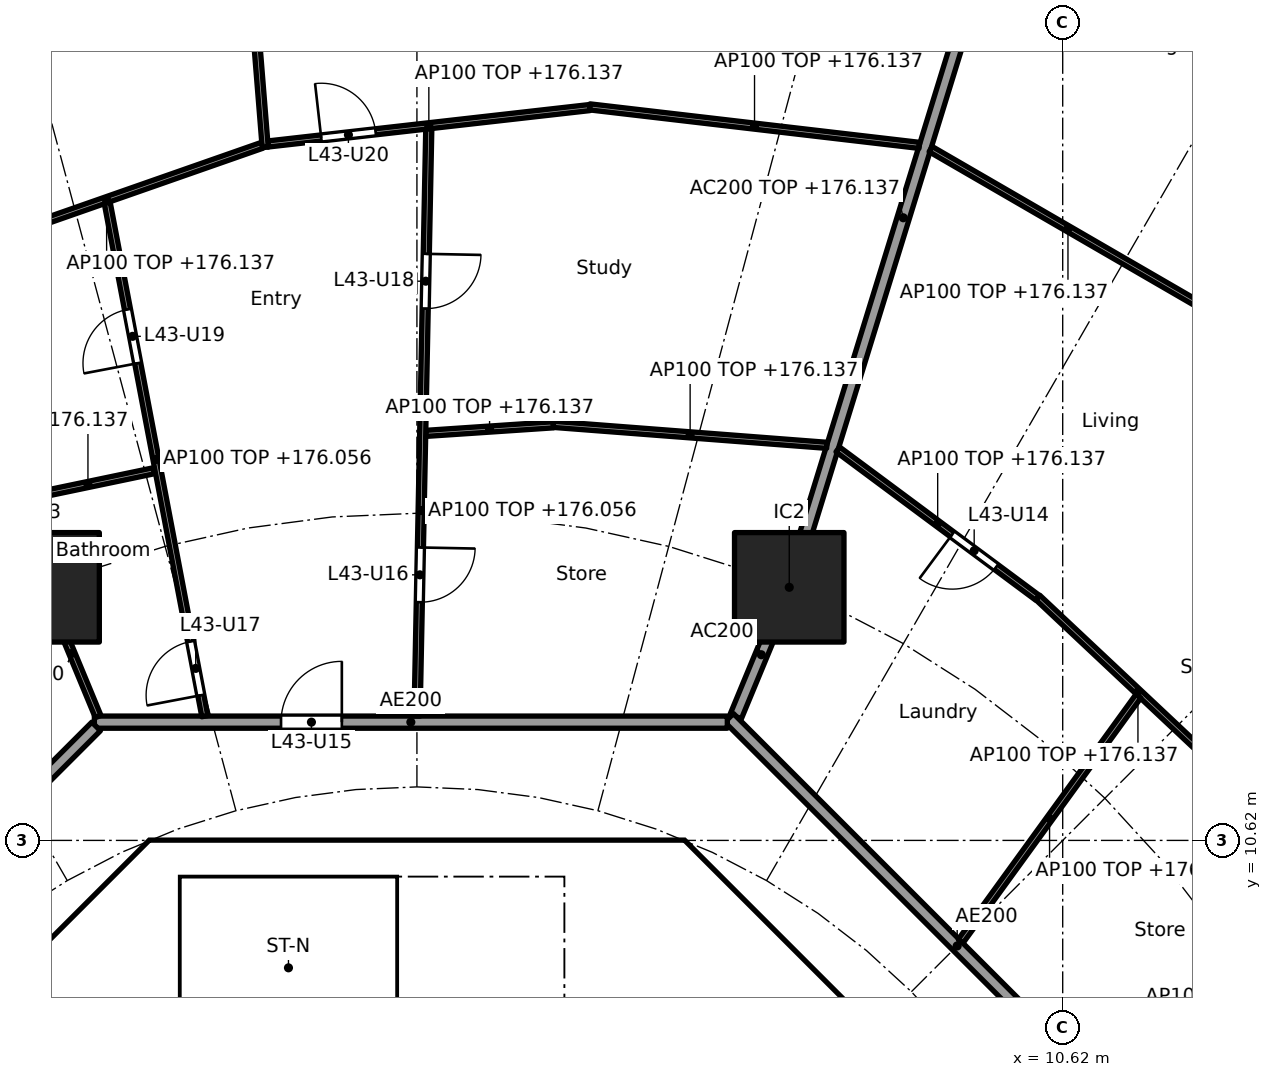
"""IFC4 building model, lengths in metres.
Left out: names, types, materials, properties, quantities, classifications, styles, units other than length and angle.
Written with IfcOpenShell. Run it as: python <this file> out.ifc"""

import sys

from ifc_helpers import new_model, si_unit, direction, frame, frame_2d, origin, origin_2d, place, context, subcontext, project, spatial, polyline, rectangle, outline, extrude, element, fill, save


model = new_model("IFC4")
c1 = context("Model", 3, precision=1e-05, world=origin(), true_north=direction((0.0, 1.0)))
c2 = subcontext(c1, "Body", "Model", "MODEL_VIEW")
j1 = project(units=[si_unit("LENGTHUNIT", "METRE"), si_unit("PLANEANGLEUNIT", "RADIAN")], contexts=[c1])
p1 = place(None, origin())
s1 = spatial("IfcSite", under=j1, at=p1, CompositionType="ELEMENT")
p2 = place(p1, origin())
s2 = spatial("IfcBuilding", under=s1, at=p2, CompositionType="ELEMENT")
p3 = place(p2, frame((0.0, 0.0, 173.3)))
s3 = spatial("IfcBuildingStorey", under=s2, at=p3, CompositionType="ELEMENT", Elevation=173.3)
for number, where, z_axis, x_axis in (
    (1, (6.123, 14.782, 0.0), (0.0, 0.0, 1.0), (1.0, 0.0, 0.0)),
    (2, (-6.123, 14.782, 0.0), (0.0, 0.0, 1.0), (1.0, 0.0, 0.0)),
):
    element("IfcColumn", number, at=place(p3, frame(where, z_axis=z_axis, x_axis=x_axis)), inside=s3, PredefinedType="COLUMN", context=c2, shape_type="SweptSolid", body=[
        extrude(rectangle(XDim=1.8, YDim=1.8, at=origin_2d()), origin(), (0.0, 0.0, 1.0), 3.7),
    ])
p4 = place(p3, frame((9.988, 4.613, 0.0), z_axis=(0.0, 0.0, 1.0), x_axis=(-0.707106781187, 0.707106781187, 0.0)))
e3 = element("IfcWall", 3, at=p4, inside=s3, PredefinedType="SHEAR", context=c2, shape_type="SweptSolid", body=[
    extrude(rectangle(XDim=7.602, YDim=0.6, at=frame_2d((3.801, 0.0))), origin(), (0.0, 0.0, 1.0), 3.44),
])
p5 = place(p4, frame((3.201, 0.0, 0.0)))
e4 = element("IfcOpeningElement", 4, at=p5, cuts=e3, PredefinedType="OPENING", context=c2, shape_type="SweptSolid", body=[
    extrude(rectangle(XDim=1.2, YDim=2.1, at=frame_2d((0.6, 1.05))), frame((0.0, 0.31, 0.0), z_axis=(0.0, -1.0, 0.0), x_axis=(1.0, 0.0, 0.0)), (0.0, 0.0, 1.0), 0.62),
])
p6 = place(p3, frame((-4.613, 9.988, 0.0), z_axis=(0.0, 0.0, 1.0), x_axis=(-0.707106781187, -0.707106781187, 0.0)))
e5 = element("IfcWall", 5, at=p6, inside=s3, PredefinedType="SHEAR", context=c2, shape_type="SweptSolid", body=[
    extrude(rectangle(XDim=7.602, YDim=0.6, at=frame_2d((3.801, 0.0))), origin(), (0.0, 0.0, 1.0), 3.44),
])
p7 = place(p6, frame((0.351, 0.0, 0.0)))
e6 = element("IfcOpeningElement", 6, at=p7, cuts=e5, PredefinedType="OPENING", context=c2, shape_type="SweptSolid", body=[
    extrude(rectangle(XDim=1.1, YDim=2.1, at=frame_2d((0.55, 1.05))), frame((0.0, 0.31, 0.0), z_axis=(0.0, -1.0, 0.0), x_axis=(1.0, 0.0, 0.0)), (0.0, 0.0, 1.0), 0.62),
])
p8 = place(p3, frame((-5.8, 4.3, 0.0), z_axis=(0.0, 0.0, 1.0), x_axis=(0.0, 1.0, 0.0)))
e7 = element("IfcWall", 7, at=p8, inside=s3, PredefinedType="PARTITIONING", context=c2, shape_type="SweptSolid", body=[
    extrude(rectangle(XDim=3.927, YDim=0.15, at=frame_2d((1.963, 0.0))), origin(), (0.0, 0.0, 1.0), 3.44),
])
p9 = place(p8, frame((0.413, 0.0, 0.0)))
e8 = element("IfcOpeningElement", 8, at=p9, cuts=e7, PredefinedType="OPENING", context=c2, shape_type="SweptSolid", body=[
    extrude(rectangle(XDim=0.9, YDim=2.1, at=frame_2d((0.45, 1.05))), frame((0.0, 0.085, 0.0), z_axis=(0.0, -1.0, 0.0), x_axis=(1.0, 0.0, 0.0)), (0.0, 0.0, 1.0), 0.17),
])
p10 = place(p8, frame((2.489, 0.0, 0.0)))
e9 = element("IfcOpeningElement", 9, at=p10, cuts=e7, PredefinedType="OPENING", context=c2, shape_type="SweptSolid", body=[
    extrude(rectangle(XDim=0.9, YDim=2.1, at=frame_2d((0.45, 1.05))), frame((0.0, 0.085, 0.0), z_axis=(0.0, -1.0, 0.0), x_axis=(1.0, 0.0, 0.0)), (0.0, 0.0, 1.0), 0.17),
])
p11 = place(p3, frame((4.0, 7.025, 0.0), z_axis=(0.0, 0.0, 1.0), x_axis=(0.0, 1.0, 0.0)))
e10 = element("IfcWall", 10, at=p11, inside=s3, PredefinedType="SOLIDWALL", context=c2, shape_type="SweptSolid", body=[
    extrude(rectangle(XDim=3.0, YDim=0.2, at=frame_2d((1.5, 0.0))), origin(), (0.0, 0.0, 1.0), 3.44),
])
p12 = place(p11, frame((0.925, 0.0, 0.0)))
e11 = element("IfcOpeningElement", 11, at=p12, cuts=e10, PredefinedType="OPENING", context=c2, shape_type="SweptSolid", body=[
    extrude(rectangle(XDim=1.1, YDim=2.1, at=frame_2d((0.55, 1.05))), frame((0.0, 0.11, 0.0), z_axis=(0.0, -1.0, 0.0), x_axis=(1.0, 0.0, 0.0)), (0.0, 0.0, 1.0), 0.22),
])
p13 = place(p3, origin())
e12 = element("IfcWall", 12, at=p13, inside=s3, PredefinedType="SHEAR", context=c2, shape_type="SweptSolid", body=[
    extrude(outline(polyline([(-4.152, 10.025), (-4.401, 9.776), (-4.825, 10.2), (-4.401, 10.625), (4.401, 10.625), (4.825, 10.2), (4.401, 9.776), (4.152, 10.025), (-4.152, 10.025)])), origin(), (0.0, 0.0, 1.0), 3.44),
])
p14 = place(p3, origin())
e13 = element("IfcWall", 13, at=p14, inside=s3, PredefinedType="SOLIDWALL", context=c2, shape_type="SweptSolid", body=[
    extrude(outline(polyline([(-3.9, 7.025), (-4.1, 7.025), (-4.1, 10.025), (-3.9, 10.025), (-3.9, 7.025)])), origin(), (0.0, 0.0, 1.0), 3.44),
])
p15 = place(p3, frame((5.243, 12.657, 0.0), z_axis=(0.0, 0.0, 1.0), x_axis=(0.382747093259, 0.923853160736, 0.0)))
e14 = element("IfcWall", 14, at=p15, inside=s3, PredefinedType="PARTITIONING", context=c2, shape_type="SweptSolid", body=[
    extrude(rectangle(XDim=2.2, YDim=0.2, at=frame_2d((1.1, 0.0))), origin(), (0.0, 0.0, 1.0), 3.44),
])
p16 = place(p3, frame((6.138, 14.83, 0.0), z_axis=(0.0, 0.0, 1.0), x_axis=(0.294818517221, 0.955553264818, 0.0)))
e15 = element("IfcWall", 15, at=p16, inside=s3, PredefinedType="PARTITIONING", context=c2, shape_type="SweptSolid", body=[
    extrude(rectangle(XDim=12.619, YDim=0.2, at=frame_2d((6.31, 0.0))), origin(), (0.0, 0.0, 1.0), 2.837),
])
p17 = place(p3, frame((12.635, 5.134, 0.0), z_axis=(0.0, 0.0, 1.0), x_axis=(-0.707106781187, 0.707106781187, 0.0)))
e16 = element("IfcWall", 16, at=p17, inside=s3, PredefinedType="PARTITIONING", context=c2, shape_type="SweptSolid", body=[
    extrude(rectangle(XDim=10.609, YDim=0.2, at=frame_2d((5.305, 0.0))), origin(), (0.0, 0.0, 1.0), 3.44),
])
p18 = place(p3, frame((5.104, 12.565, 0.0), z_axis=(0.0, 0.0, 1.0), x_axis=(-1.0, 0.0, 0.0)))
e17 = element("IfcWall", 17, at=p18, inside=s3, PredefinedType="PARTITIONING", context=c2, shape_type="SweptSolid", body=[
    extrude(rectangle(XDim=10.409, YDim=0.2, at=frame_2d((5.205, 0.0))), origin(), (0.0, 0.0, 1.0), 3.44),
])
p19 = place(p18, frame((6.339, 0.0, 0.0)))
e18 = element("IfcOpeningElement", 18, at=p19, cuts=e17, PredefinedType="OPENING", context=c2, shape_type="SweptSolid", body=[
    extrude(rectangle(XDim=1.0, YDim=2.1, at=frame_2d((0.5, 1.05))), frame((0.0, 0.11, 0.0), z_axis=(0.0, -1.0, 0.0), x_axis=(1.0, 0.0, 0.0)), (0.0, 0.0, 1.0), 0.22),
])
p20 = place(p3, frame((-5.275, 12.494, 0.0), z_axis=(0.0, 0.0, 1.0), x_axis=(-0.707106781187, -0.707106781187, 0.0)))
e19 = element("IfcWall", 19, at=p20, inside=s3, PredefinedType="PARTITIONING", context=c2, shape_type="SweptSolid", body=[
    extrude(rectangle(XDim=10.209, YDim=0.2, at=frame_2d((5.104, 0.0))), origin(), (0.0, 0.0, 1.0), 3.44),
])
p21 = place(p3, frame((13.504, 11.52, 0.0), z_axis=(0.0, 0.0, 1.0), x_axis=(-0.728883199496, 0.684638066055, 0.0)))
e20 = element("IfcWall", 20, at=p21, inside=s3, PredefinedType="PARTITIONING", context=c2, shape_type="SweptSolid", body=[
    extrude(rectangle(XDim=4.519, YDim=0.1, at=frame_2d((2.26, 0.0))), origin(), (0.0, 0.0, 1.0), 2.837),
])
p22 = place(p3, frame((8.943, 8.966, 0.0), z_axis=(0.0, 0.0, 1.0), x_axis=(0.587187896734, 0.809450661825, 0.0)))
e21 = element("IfcWall", 21, at=p22, inside=s3, PredefinedType="PARTITIONING", context=c2, shape_type="SweptSolid", body=[
    extrude(rectangle(XDim=4.975, YDim=0.1, at=frame_2d((2.487, 0.0))), origin(), (0.0, 0.0, 1.0), 2.756),
])
p23 = place(p3, frame((10.207, 14.61, 0.0), z_axis=(0.0, 0.0, 1.0), x_axis=(-0.802769141821, 0.596289950394, 0.0)))
e22 = element("IfcWall", 22, at=p23, inside=s3, PredefinedType="PARTITIONING", context=c2, shape_type="SweptSolid", body=[
    extrude(rectangle(XDim=4.092, YDim=0.1, at=frame_2d((2.046, 0.0))), origin(), (0.0, 0.0, 1.0), 2.837),
])
p24 = place(p23, frame((0.848, 0.0, 0.0)))
e23 = element("IfcOpeningElement", 23, at=p24, cuts=e22, PredefinedType="OPENING", context=c2, shape_type="SweptSolid", body=[
    extrude(rectangle(XDim=0.9, YDim=2.1, at=frame_2d((0.45, 1.05))), frame((0.0, 0.06, 0.0), z_axis=(0.0, -1.0, 0.0), x_axis=(1.0, 0.0, 0.0)), (0.0, 0.0, 1.0), 0.12),
])
p25 = place(p3, frame((12.965, 19.371, 0.0), z_axis=(0.0, 0.0, 1.0), x_axis=(-0.865286427811, 0.501277765163, 0.0)))
e24 = element("IfcWall", 24, at=p25, inside=s3, PredefinedType="PARTITIONING", context=c2, shape_type="SweptSolid", body=[
    extrude(rectangle(XDim=5.22, YDim=0.1, at=frame_2d((2.61, 0.0))), origin(), (0.0, 0.0, 1.0), 2.837),
])
p26 = place(p3, frame((6.741, 17.117, 0.0), z_axis=(0.0, 0.0, 1.0), x_axis=(-0.997078320723, 0.076386008825, 0.0)))
e25 = element("IfcWall", 25, at=p26, inside=s3, PredefinedType="PARTITIONING", context=c2, shape_type="SweptSolid", body=[
    extrude(rectangle(XDim=4.51, YDim=0.1, at=frame_2d((2.255, 0.0))), origin(), (0.0, 0.0, 1.0), 2.837),
])
p27 = place(p3, frame((8.262, 22.05, 0.0), z_axis=(0.0, 0.0, 1.0), x_axis=(-0.993250089265, 0.115992500516, 0.0)))
e26 = element("IfcWall", 26, at=p27, inside=s3, PredefinedType="PARTITIONING", context=c2, shape_type="SweptSolid", body=[
    extrude(rectangle(XDim=5.458, YDim=0.1, at=frame_2d((2.729, 0.0))), origin(), (0.0, 0.0, 1.0), 2.837),
])
p28 = place(p3, frame((2.244, 17.455, 0.0), z_axis=(0.0, 0.0, 1.0), x_axis=(-0.997756833447, -0.06694252243, 0.0)))
e27 = element("IfcWall", 27, at=p28, inside=s3, PredefinedType="PARTITIONING", context=c2, shape_type="SweptSolid", body=[
    extrude(rectangle(XDim=2.104, YDim=0.1, at=frame_2d((1.052, 0.0))), origin(), (0.0, 0.0, 1.0), 2.837),
])
p29 = place(p3, frame((2.842, 22.671, 0.0), z_axis=(0.0, 0.0, 1.0), x_axis=(-0.993660315081, -0.112424099879, 0.0)))
e28 = element("IfcWall", 28, at=p29, inside=s3, PredefinedType="PARTITIONING", context=c2, shape_type="SweptSolid", body=[
    extrude(rectangle(XDim=5.325, YDim=0.1, at=frame_2d((2.662, 0.0))), origin(), (0.0, 0.0, 1.0), 2.837),
])
p30 = place(p29, frame((3.544, 0.0, 0.0)))
e29 = element("IfcOpeningElement", 29, at=p30, cuts=e28, PredefinedType="OPENING", context=c2, shape_type="SweptSolid", body=[
    extrude(rectangle(XDim=0.9, YDim=2.1, at=frame_2d((0.45, 1.05))), frame((0.0, 0.06, 0.0), z_axis=(0.0, -1.0, 0.0), x_axis=(1.0, 0.0, 0.0)), (0.0, 0.0, 1.0), 0.12),
])
p31 = place(p3, frame((0.002, 12.665, 0.0), z_axis=(0.0, 0.0, 1.0), x_axis=(0.019992969345, 0.999800120613, 0.0)))
e30 = element("IfcWall", 30, at=p31, inside=s3, PredefinedType="PARTITIONING", context=c2, shape_type="SweptSolid", body=[
    extrude(rectangle(XDim=9.659, YDim=0.1, at=frame_2d((4.83, 0.0))), origin(), (0.0, 0.0, 1.0), 2.756),
])
p32 = place(p31, frame((1.873, 0.0, 0.0)))
e31 = element("IfcOpeningElement", 31, at=p32, cuts=e30, PredefinedType="OPENING", context=c2, shape_type="SweptSolid", body=[
    extrude(rectangle(XDim=0.9, YDim=2.1, at=frame_2d((0.45, 1.05))), frame((0.0, 0.06, 0.0), z_axis=(0.0, -1.0, 0.0), x_axis=(1.0, 0.0, 0.0)), (0.0, 0.0, 1.0), 0.12),
])
p33 = place(p31, frame((6.703, 0.0, 0.0)))
e32 = element("IfcOpeningElement", 32, at=p33, cuts=e30, PredefinedType="OPENING", context=c2, shape_type="SweptSolid", body=[
    extrude(rectangle(XDim=0.9, YDim=2.1, at=frame_2d((0.45, 1.05))), frame((0.0, 0.06, 0.0), z_axis=(0.0, -1.0, 0.0), x_axis=(1.0, 0.0, 0.0)), (0.0, 0.0, 1.0), 0.12),
])
p34 = place(p3, frame((-2.495, 22.017, 0.0), z_axis=(0.0, 0.0, 1.0), x_axis=(-0.080150660566, 0.99678276049, 0.0)))
e33 = element("IfcWall", 33, at=p34, inside=s3, PredefinedType="PARTITIONING", context=c2, shape_type="SweptSolid", body=[
    extrude(rectangle(XDim=4.858, YDim=0.1, at=frame_2d((2.429, 0.0))), origin(), (0.0, 0.0, 1.0), 2.837),
])
p35 = place(p34, frame((2.004, 0.0, 0.0)))
e34 = element("IfcOpeningElement", 34, at=p35, cuts=e33, PredefinedType="OPENING", context=c2, shape_type="SweptSolid", body=[
    extrude(rectangle(XDim=0.9, YDim=2.1, at=frame_2d((0.45, 1.05))), frame((0.0, 0.06, 0.0), z_axis=(0.0, -1.0, 0.0), x_axis=(1.0, 0.0, 0.0)), (0.0, 0.0, 1.0), 0.12),
])
p36 = place(p3, frame((-2.546, 22.051, 0.0), z_axis=(0.0, 0.0, 1.0), x_axis=(-0.943911038661, -0.330199865375, 0.0)))
e35 = element("IfcWall", 35, at=p36, inside=s3, PredefinedType="PARTITIONING", context=c2, shape_type="SweptSolid", body=[
    extrude(rectangle(XDim=5.417, YDim=0.1, at=frame_2d((2.709, 0.0))), origin(), (0.0, 0.0, 1.0), 2.837),
])
p37 = place(p3, frame((-3.488, 12.663, 0.0), z_axis=(0.0, 0.0, 1.0), x_axis=(-0.186783185485, 0.982401161247, 0.0)))
e36 = element("IfcWall", 36, at=p37, inside=s3, PredefinedType="PARTITIONING", context=c2, shape_type="SweptSolid", body=[
    extrude(rectangle(XDim=8.595, YDim=0.1, at=frame_2d((4.298, 0.0))), origin(), (0.0, 0.0, 1.0), 2.756),
])
p38 = place(p37, frame((0.35, 0.0, 0.0)))
e37 = element("IfcOpeningElement", 37, at=p38, cuts=e36, PredefinedType="OPENING", context=c2, shape_type="SweptSolid", body=[
    extrude(rectangle(XDim=0.9, YDim=2.1, at=frame_2d((0.45, 1.05))), frame((0.0, 0.06, 0.0), z_axis=(0.0, -1.0, 0.0), x_axis=(1.0, 0.0, 0.0)), (0.0, 0.0, 1.0), 0.12),
])
p39 = place(p37, frame((5.908, 0.0, 0.0)))
e38 = element("IfcOpeningElement", 38, at=p39, cuts=e36, PredefinedType="OPENING", context=c2, shape_type="SweptSolid", body=[
    extrude(rectangle(XDim=0.9, YDim=2.1, at=frame_2d((0.45, 1.05))), frame((0.0, 0.06, 0.0), z_axis=(0.0, -1.0, 0.0), x_axis=(1.0, 0.0, 0.0)), (0.0, 0.0, 1.0), 0.12),
])
p40 = place(p3, frame((-4.324, 16.699, 0.0), z_axis=(0.0, 0.0, 1.0), x_axis=(-0.978908011866, -0.204301503432, 0.0)))
e39 = element("IfcWall", 39, at=p40, inside=s3, PredefinedType="PARTITIONING", context=c2, shape_type="SweptSolid", body=[
    extrude(rectangle(XDim=2.218, YDim=0.1, at=frame_2d((1.109, 0.0))), origin(), (0.0, 0.0, 1.0), 2.837),
])
p41 = place(p3, frame((-5.243, 12.657, 0.0), z_axis=(0.0, 0.0, 1.0), x_axis=(-0.382719158442, 0.923864733477, 0.0)))
e40 = element("IfcWall", 40, at=p41, inside=s3, PredefinedType="PARTITIONING", context=c2, shape_type="SweptSolid", body=[
    extrude(rectangle(XDim=2.25, YDim=0.1, at=frame_2d((1.125, 0.0))), origin(), (0.0, 0.0, 1.0), 3.44),
])
p42 = place(p12, origin())
e41 = element("IfcDoor", 41, at=p42, inside=s3, OperationType="SINGLE_SWING_RIGHT", PredefinedType="DOOR", context=c2, shape_type="SweptSolid", body=[
    extrude(rectangle(XDim=1.1, YDim=2.1, at=frame_2d((0.55, 1.05))), frame((0.0, 0.025, 0.0), z_axis=(0.0, -1.0, 0.0), x_axis=(1.0, 0.0, 0.0)), (0.0, 0.0, 1.0), 0.05),
])
fill(e11, e41)
p43 = place(p7, origin())
e42 = element("IfcDoor", 42, at=p43, inside=s3, OperationType="SINGLE_SWING_RIGHT", PredefinedType="DOOR", context=c2, shape_type="SweptSolid", body=[
    extrude(rectangle(XDim=1.1, YDim=2.1, at=frame_2d((0.55, 1.05))), frame((0.0, 0.025, 0.0), z_axis=(0.0, -1.0, 0.0), x_axis=(1.0, 0.0, 0.0)), (0.0, 0.0, 1.0), 0.05),
])
fill(e6, e42)
p44 = place(p24, origin())
e43 = element("IfcDoor", 43, at=p44, inside=s3, OperationType="SINGLE_SWING_RIGHT", PredefinedType="DOOR", context=c2, shape_type="SweptSolid", body=[
    extrude(rectangle(XDim=0.9, YDim=2.1, at=frame_2d((0.45, 1.05))), frame((0.0, 0.025, 0.0), z_axis=(0.0, -1.0, 0.0), x_axis=(1.0, 0.0, 0.0)), (0.0, 0.0, 1.0), 0.05),
])
fill(e23, e43)
p45 = place(p19, frame((1.0, 0.0, 0.0), x_axis=(-1.0, 0.0, 0.0)))
e44 = element("IfcDoor", 44, at=p45, inside=s3, OperationType="SINGLE_SWING_RIGHT", PredefinedType="DOOR", context=c2, shape_type="SweptSolid", body=[
    extrude(rectangle(XDim=1.0, YDim=2.1, at=frame_2d((0.5, 1.05))), frame((0.0, 0.025, 0.0), z_axis=(0.0, -1.0, 0.0), x_axis=(1.0, 0.0, 0.0)), (0.0, 0.0, 1.0), 0.05),
])
fill(e18, e44)
p46 = place(p32, frame((0.9, 0.0, 0.0), x_axis=(-1.0, 0.0, 0.0)))
e45 = element("IfcDoor", 45, at=p46, inside=s3, OperationType="SINGLE_SWING_LEFT", PredefinedType="DOOR", context=c2, shape_type="SweptSolid", body=[
    extrude(rectangle(XDim=0.9, YDim=2.1, at=frame_2d((0.45, 1.05))), frame((0.0, 0.025, 0.0), z_axis=(0.0, -1.0, 0.0), x_axis=(1.0, 0.0, 0.0)), (0.0, 0.0, 1.0), 0.05),
])
fill(e31, e45)
p47 = place(p38, origin())
e46 = element("IfcDoor", 46, at=p47, inside=s3, OperationType="SINGLE_SWING_LEFT", PredefinedType="DOOR", context=c2, shape_type="SweptSolid", body=[
    extrude(rectangle(XDim=0.9, YDim=2.1, at=frame_2d((0.45, 1.05))), frame((0.0, 0.025, 0.0), z_axis=(0.0, -1.0, 0.0), x_axis=(1.0, 0.0, 0.0)), (0.0, 0.0, 1.0), 0.05),
])
fill(e37, e46)
p48 = place(p33, frame((0.9, 0.0, 0.0), x_axis=(-1.0, 0.0, 0.0)))
e47 = element("IfcDoor", 47, at=p48, inside=s3, OperationType="SINGLE_SWING_LEFT", PredefinedType="DOOR", context=c2, shape_type="SweptSolid", body=[
    extrude(rectangle(XDim=0.9, YDim=2.1, at=frame_2d((0.45, 1.05))), frame((0.0, 0.025, 0.0), z_axis=(0.0, -1.0, 0.0), x_axis=(1.0, 0.0, 0.0)), (0.0, 0.0, 1.0), 0.05),
])
fill(e32, e47)
p49 = place(p39, origin())
e48 = element("IfcDoor", 48, at=p49, inside=s3, OperationType="SINGLE_SWING_LEFT", PredefinedType="DOOR", context=c2, shape_type="SweptSolid", body=[
    extrude(rectangle(XDim=0.9, YDim=2.1, at=frame_2d((0.45, 1.05))), frame((0.0, 0.025, 0.0), z_axis=(0.0, -1.0, 0.0), x_axis=(1.0, 0.0, 0.0)), (0.0, 0.0, 1.0), 0.05),
])
fill(e38, e48)
p50 = place(p30, frame((0.9, 0.0, 0.0), x_axis=(-1.0, 0.0, 0.0)))
e49 = element("IfcDoor", 49, at=p50, inside=s3, OperationType="SINGLE_SWING_LEFT", PredefinedType="DOOR", context=c2, shape_type="SweptSolid", body=[
    extrude(rectangle(XDim=0.9, YDim=2.1, at=frame_2d((0.45, 1.05))), frame((0.0, 0.025, 0.0), z_axis=(0.0, -1.0, 0.0), x_axis=(1.0, 0.0, 0.0)), (0.0, 0.0, 1.0), 0.05),
])
fill(e29, e49)
save(model, sys.argv[1])
